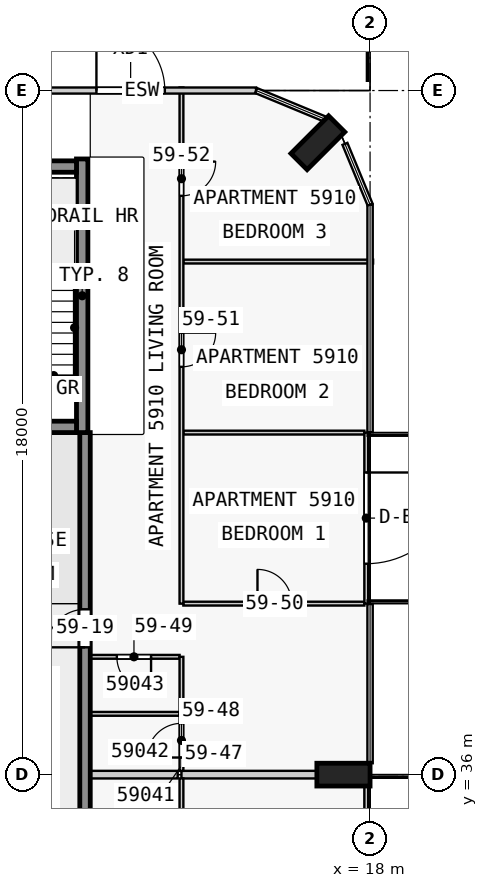
"""IFC4 building model, lengths in metres.
Left out: names, types, materials, properties, quantities, classifications, styles, units other than length and angle.
Written with IfcOpenShell. Run it as: python <this file> out.ifc"""

import sys

from ifc_helpers import new_model, si_unit, direction, frame, frame_2d, origin, origin_2d, place, context, subcontext, project, spatial, rectangle, extrude, element, fill, save


model = new_model("IFC4")
c1 = context("Model", 3, precision=1e-05, world=origin(), true_north=direction((0.0, 1.0)))
c2 = subcontext(c1, "Body", "Model", "MODEL_VIEW")
j1 = project(units=[si_unit("LENGTHUNIT", "METRE"), si_unit("PLANEANGLEUNIT", "RADIAN")], contexts=[c1])
p1 = place(None, origin())
s1 = spatial("IfcSite", under=j1, at=p1, CompositionType="ELEMENT")
p2 = place(p1, origin())
s2 = spatial("IfcBuilding", under=s1, at=p2, CompositionType="ELEMENT")
p3 = place(p2, frame((0.0, 0.0, 225.9)))
s3 = spatial("IfcBuildingStorey", under=s2, at=p3, CompositionType="ELEMENT", Elevation=225.9)
for number, where, z_axis, x_axis in (
    (1, (17.3, 36.0, 0.0), (0.0, 0.0, 1.0), (0.0, 1.0, 0.0)),
    (2, (16.626, 52.626, 0.0), (0.0, 0.0, 1.0), (-0.707, 0.707, 0.0)),
):
    element("IfcColumn", number, at=place(p3, frame(where, z_axis=z_axis, x_axis=x_axis)), inside=s3, PredefinedType="COLUMN", context=c2, shape_type="SweptSolid", body=[
        extrude(rectangle(XDim=0.6, YDim=1.4, at=origin_2d()), origin(), (0.0, 0.0, 1.0), 3.5),
    ])
p4 = place(p3, frame((7.725, 45.15, 0.0), z_axis=(0.0, 0.0, 1.0), x_axis=(1.0, 0.0, 0.0)))
e3 = element("IfcWall", 3, at=p4, inside=s3, PredefinedType="SHEAR", context=c2, shape_type="SweptSolid", body=[
    extrude(rectangle(XDim=2.55, YDim=0.3, at=frame_2d((1.275, 0.0))), origin(), (0.0, 0.0, 1.0), 3.5),
])
p5 = place(p4, frame((0.725, 0.0, 0.0)))
e4 = element("IfcOpeningElement", 4, at=p5, cuts=e3, PredefinedType="OPENING", context=c2, shape_type="SweptSolid", body=[
    extrude(rectangle(XDim=1.1, YDim=2.1, at=frame_2d((0.55, 1.05))), frame((0.0, 0.16, 0.0), z_axis=(0.0, -1.0, 0.0), x_axis=(1.0, 0.0, 0.0)), (0.0, 0.0, 1.0), 0.32),
])
p6 = place(p3, frame((7.725, 52.0, 0.0), z_axis=(0.0, 0.0, 1.0), x_axis=(1.0, 0.0, 0.0)))
e5 = element("IfcWall", 5, at=p6, inside=s3, PredefinedType="SHEAR", context=c2, shape_type="SweptSolid", body=[
    extrude(rectangle(XDim=2.55, YDim=0.3, at=frame_2d((1.275, 0.0))), origin(), (0.0, 0.0, 1.0), 3.5),
])
p7 = place(p3, frame((10.425, 45.0, 0.0), z_axis=(0.0, 0.0, 1.0), x_axis=(0.0, 1.0, 0.0)))
e6 = element("IfcWall", 6, at=p7, inside=s3, PredefinedType="SHEAR", context=c2, shape_type="SweptSolid", body=[
    extrude(rectangle(XDim=7.2, YDim=0.3, at=frame_2d((3.6, 0.0))), origin(), (0.0, 0.0, 1.0), 3.5),
])
p8 = place(p3, frame((10.5, 18.0, 0.0), z_axis=(0.0, 0.0, 1.0), x_axis=(0.0, 1.0, 0.0)))
e7 = element("IfcWall", 7, at=p8, inside=s3, PredefinedType="SHEAR", context=c2, shape_type="SweptSolid", body=[
    extrude(rectangle(XDim=27.0, YDim=0.275, at=frame_2d((13.5, 0.0))), origin(), (0.0, 0.0, 1.0), 3.05),
])
p9 = place(p8, frame((4.05, 0.0, 0.0)))
e8 = element("IfcOpeningElement", 8, at=p9, cuts=e7, PredefinedType="OPENING", context=c2, shape_type="SweptSolid", body=[
    extrude(rectangle(XDim=1.0, YDim=2.1, at=frame_2d((0.5, 1.05))), frame((0.0, 0.147, 0.0), z_axis=(0.0, -1.0, 0.0), x_axis=(1.0, 0.0, 0.0)), (0.0, 0.0, 1.0), 0.295),
])
p10 = place(p8, frame((10.35, 0.0, 0.0)))
e9 = element("IfcOpeningElement", 9, at=p10, cuts=e7, PredefinedType="OPENING", context=c2, shape_type="SweptSolid", body=[
    extrude(rectangle(XDim=1.8, YDim=2.1, at=frame_2d((0.9, 1.05))), frame((0.0, 0.147, 0.0), z_axis=(0.0, -1.0, 0.0), x_axis=(1.0, 0.0, 0.0)), (0.0, 0.0, 1.0), 0.295),
])
p11 = place(p8, frame((15.25, 0.0, 0.0)))
e10 = element("IfcOpeningElement", 10, at=p11, cuts=e7, PredefinedType="OPENING", context=c2, shape_type="SweptSolid", body=[
    extrude(rectangle(XDim=1.0, YDim=2.1, at=frame_2d((0.5, 1.05))), frame((0.0, 0.147, 0.0), z_axis=(0.0, -1.0, 0.0), x_axis=(1.0, 0.0, 0.0)), (0.0, 0.0, 1.0), 0.295),
])
p12 = place(p8, frame((21.35, 0.0, 0.0)))
e11 = element("IfcOpeningElement", 11, at=p12, cuts=e7, PredefinedType="OPENING", context=c2, shape_type="SweptSolid", body=[
    extrude(rectangle(XDim=1.0, YDim=2.1, at=frame_2d((0.5, 1.05))), frame((0.0, 0.147, 0.0), z_axis=(0.0, -1.0, 0.0), x_axis=(1.0, 0.0, 0.0)), (0.0, 0.0, 1.0), 0.295),
])
p13 = place(p3, frame((9.0, 54.0, 0.0), z_axis=(0.0, 0.0, 1.0), x_axis=(1.0, 0.0, 0.0)))
e12 = element("IfcWall", 12, at=p13, inside=s3, PredefinedType="STANDARD", context=c2, shape_type="SweptSolid", body=[
    extrude(rectangle(XDim=6.0, YDim=0.16, at=frame_2d((3.0, 0.0))), origin(), (0.0, 0.0, 1.0), 3.5),
])
p14 = place(p13, frame((1.8, 0.0, 0.0)))
e13 = element("IfcOpeningElement", 13, at=p14, cuts=e12, PredefinedType="OPENING", context=c2, shape_type="SweptSolid", body=[
    extrude(rectangle(XDim=1.8, YDim=2.4, at=frame_2d((0.9, 1.2))), frame((0.0, 0.09, 0.0), z_axis=(0.0, -1.0, 0.0), x_axis=(1.0, 0.0, 0.0)), (0.0, 0.0, 1.0), 0.18),
])
p15 = place(p3, frame((17.9, 36.0, 0.0), z_axis=(0.0, 0.0, 1.0), x_axis=(0.0, -1.0, 0.0)))
e14 = element("IfcWall", 14, at=p15, inside=s3, PredefinedType="STANDARD", context=c2, shape_type="SweptSolid", body=[
    extrude(rectangle(XDim=4.5, YDim=0.1, at=frame_2d((2.25, 0.0))), origin(), (0.0, 0.0, 1.0), 3.05),
])
p16 = place(p15, frame((1.05, 0.0, 0.0)))
e15 = element("IfcOpeningElement", 15, at=p16, cuts=e14, PredefinedType="OPENING", context=c2, shape_type="SweptSolid", body=[
    extrude(rectangle(XDim=2.4, YDim=2.4, at=frame_2d((1.2, 1.2))), frame((0.0, 0.06, 0.0), z_axis=(0.0, -1.0, 0.0), x_axis=(1.0, 0.0, 0.0)), (0.0, 0.0, 1.0), 0.12),
])
p17 = place(p3, frame((17.9, 45.0, 0.0), z_axis=(0.0, 0.0, 1.0), x_axis=(0.0, -1.0, 0.0)))
e16 = element("IfcWall", 16, at=p17, inside=s3, PredefinedType="STANDARD", context=c2, shape_type="SweptSolid", body=[
    extrude(rectangle(XDim=4.5, YDim=0.1, at=frame_2d((2.25, 0.0))), origin(), (0.0, 0.0, 1.0), 3.05),
])
p18 = place(p17, frame((1.05, 0.0, 0.0)))
e17 = element("IfcOpeningElement", 17, at=p18, cuts=e16, PredefinedType="OPENING", context=c2, shape_type="SweptSolid", body=[
    extrude(rectangle(XDim=2.4, YDim=2.4, at=frame_2d((1.2, 1.2))), frame((0.0, 0.06, 0.0), z_axis=(0.0, -1.0, 0.0), x_axis=(1.0, 0.0, 0.0)), (0.0, 0.0, 1.0), 0.12),
])
p19 = place(p3, frame((12.938, 36.0, 0.0), z_axis=(0.0, 0.0, 1.0), x_axis=(-1.0, 0.0, 0.0)))
e18 = element("IfcWall", 18, at=p19, inside=s3, PredefinedType="PARTITIONING", context=c2, shape_type="SweptSolid", body=[
    extrude(rectangle(XDim=2.3, YDim=0.2, at=frame_2d((1.15, 0.0))), origin(), (0.0, 0.0, 1.0), 3.05),
])
p20 = place(p3, frame((13.038, 36.0, 0.0), z_axis=(0.0, 0.0, 1.0), x_axis=(1.0, 0.0, 0.0)))
e19 = element("IfcWall", 19, at=p20, inside=s3, PredefinedType="PARTITIONING", context=c2, shape_type="SweptSolid", body=[
    extrude(rectangle(XDim=3.562, YDim=0.2, at=frame_2d((1.781, 0.0))), origin(), (0.0, 0.0, 1.0), 3.05),
])
p21 = place(p3, frame((12.988, 37.6, 0.0), z_axis=(0.0, 0.0, 1.0), x_axis=(-1.0, 0.0, 0.0)))
e20 = element("IfcWall", 20, at=p21, inside=s3, PredefinedType="PARTITIONING", context=c2, shape_type="SweptSolid", body=[
    extrude(rectangle(XDim=2.35, YDim=0.1, at=frame_2d((1.175, 0.0))), origin(), (0.0, 0.0, 1.0), 3.05),
])
p22 = place(p3, frame((12.988, 39.1, 0.0), z_axis=(0.0, 0.0, 1.0), x_axis=(-1.0, 0.0, 0.0)))
e21 = element("IfcWall", 21, at=p22, inside=s3, PredefinedType="PARTITIONING", context=c2, shape_type="SweptSolid", body=[
    extrude(rectangle(XDim=2.35, YDim=0.1, at=frame_2d((1.175, 0.0))), origin(), (0.0, 0.0, 1.0), 3.05),
])
p23 = place(p22, frame((0.75, 0.0, 0.0)))
e22 = element("IfcOpeningElement", 22, at=p23, cuts=e21, PredefinedType="OPENING", context=c2, shape_type="SweptSolid", body=[
    extrude(rectangle(XDim=0.9, YDim=2.1, at=frame_2d((0.45, 1.05))), frame((0.0, 0.06, 0.0), z_axis=(0.0, -1.0, 0.0), x_axis=(1.0, 0.0, 0.0)), (0.0, 0.0, 1.0), 0.12),
])
p24 = place(p3, frame((13.087, 40.5, 0.0), z_axis=(0.0, 0.0, 1.0), x_axis=(1.0, 0.0, 0.0)))
e23 = element("IfcWall", 23, at=p24, inside=s3, PredefinedType="PARTITIONING", context=c2, shape_type="SweptSolid", body=[
    extrude(rectangle(XDim=4.763, YDim=0.1, at=frame_2d((2.381, 0.0))), origin(), (0.0, 0.0, 1.0), 3.05),
])
p25 = place(p24, frame((1.95, 0.0, 0.0)))
e24 = element("IfcOpeningElement", 24, at=p25, cuts=e23, PredefinedType="OPENING", context=c2, shape_type="SweptSolid", body=[
    extrude(rectangle(XDim=0.9, YDim=2.1, at=frame_2d((0.45, 1.05))), frame((0.0, 0.06, 0.0), z_axis=(0.0, -1.0, 0.0), x_axis=(1.0, 0.0, 0.0)), (0.0, 0.0, 1.0), 0.12),
])
p26 = place(p3, frame((17.85, 45.0, 0.0), z_axis=(0.0, 0.0, 1.0), x_axis=(-1.0, 0.0, 0.0)))
e25 = element("IfcWall", 25, at=p26, inside=s3, PredefinedType="PARTITIONING", context=c2, shape_type="SweptSolid", body=[
    extrude(rectangle(XDim=4.763, YDim=0.1, at=frame_2d((2.381, 0.0))), origin(), (0.0, 0.0, 1.0), 3.05),
])
p27 = place(p3, frame((18.08, 49.5, 0.0), z_axis=(0.0, 0.0, 1.0), x_axis=(-1.0, 0.0, 0.0)))
e26 = element("IfcWall", 26, at=p27, inside=s3, PredefinedType="PARTITIONING", context=c2, shape_type="SweptSolid", body=[
    extrude(rectangle(XDim=4.993, YDim=0.1, at=frame_2d((2.496, 0.0))), origin(), (0.0, 0.0, 1.0), 3.05),
])
p28 = place(p3, frame((13.038, 54.08, 0.0), z_axis=(0.0, 0.0, 1.0), x_axis=(0.0, -1.0, 0.0)))
e27 = element("IfcWall", 27, at=p28, inside=s3, PredefinedType="PARTITIONING", context=c2, shape_type="SweptSolid", body=[
    extrude(rectangle(XDim=13.58, YDim=0.1, at=frame_2d((6.79, 0.0))), origin(), (0.0, 0.0, 1.0), 3.05),
])
p29 = place(p28, frame((6.45, 0.0, 0.0)))
e28 = element("IfcOpeningElement", 28, at=p29, cuts=e27, PredefinedType="OPENING", context=c2, shape_type="SweptSolid", body=[
    extrude(rectangle(XDim=0.9, YDim=2.1, at=frame_2d((0.45, 1.05))), frame((0.0, 0.06, 0.0), z_axis=(0.0, -1.0, 0.0), x_axis=(1.0, 0.0, 0.0)), (0.0, 0.0, 1.0), 0.12),
])
p30 = place(p28, frame((1.95, 0.0, 0.0)))
e29 = element("IfcOpeningElement", 29, at=p30, cuts=e27, PredefinedType="OPENING", context=c2, shape_type="SweptSolid", body=[
    extrude(rectangle(XDim=0.9, YDim=2.1, at=frame_2d((0.45, 1.05))), frame((0.0, 0.06, 0.0), z_axis=(0.0, -1.0, 0.0), x_axis=(1.0, 0.0, 0.0)), (0.0, 0.0, 1.0), 0.12),
])
p31 = place(p3, frame((13.038, 34.5, 0.0), z_axis=(0.0, 0.0, 1.0), x_axis=(0.0, 1.0, 0.0)))
e30 = element("IfcWall", 30, at=p31, inside=s3, PredefinedType="PARTITIONING", context=c2, shape_type="SweptSolid", body=[
    extrude(rectangle(XDim=1.4, YDim=0.1, at=frame_2d((0.7, 0.0))), origin(), (0.0, 0.0, 1.0), 3.05),
])
p32 = place(p3, frame((13.038, 36.1, 0.0), z_axis=(0.0, 0.0, 1.0), x_axis=(0.0, 1.0, 0.0)))
e31 = element("IfcWall", 31, at=p32, inside=s3, PredefinedType="PARTITIONING", context=c2, shape_type="SweptSolid", body=[
    extrude(rectangle(XDim=3.0, YDim=0.1, at=frame_2d((1.5, 0.0))), origin(), (0.0, 0.0, 1.0), 3.05),
])
p33 = place(p32, frame((0.35, 0.0, 0.0)))
e32 = element("IfcOpeningElement", 32, at=p33, cuts=e31, PredefinedType="OPENING", context=c2, shape_type="SweptSolid", body=[
    extrude(rectangle(XDim=0.9, YDim=2.1, at=frame_2d((0.45, 1.05))), frame((0.0, 0.06, 0.0), z_axis=(0.0, -1.0, 0.0), x_axis=(1.0, 0.0, 0.0)), (0.0, 0.0, 1.0), 0.12),
])
p34 = place(p14, origin())
e33 = element("IfcDoor", 33, at=p34, inside=s3, OperationType="SINGLE_SWING_LEFT", PredefinedType="DOOR", context=c2, shape_type="SweptSolid", body=[
    extrude(rectangle(XDim=1.8, YDim=2.4, at=frame_2d((0.9, 1.2))), frame((0.0, 0.025, 0.0), z_axis=(0.0, -1.0, 0.0), x_axis=(1.0, 0.0, 0.0)), (0.0, 0.0, 1.0), 0.05),
])
fill(e13, e33)
p35 = place(p18, origin())
e34 = element("IfcDoor", 34, at=p35, inside=s3, OperationType="SINGLE_SWING_LEFT", PredefinedType="DOOR", context=c2, shape_type="SweptSolid", body=[
    extrude(rectangle(XDim=2.4, YDim=2.4, at=frame_2d((1.2, 1.2))), frame((0.0, 0.025, 0.0), z_axis=(0.0, -1.0, 0.0), x_axis=(1.0, 0.0, 0.0)), (0.0, 0.0, 1.0), 0.05),
])
fill(e17, e34)
p36 = place(p12, origin())
e35 = element("IfcDoor", 35, at=p36, inside=s3, OperationType="SINGLE_SWING_RIGHT", PredefinedType="DOOR", context=c2, shape_type="SweptSolid", body=[
    extrude(rectangle(XDim=1.0, YDim=2.1, at=frame_2d((0.5, 1.05))), frame((0.0, 0.025, 0.0), z_axis=(0.0, -1.0, 0.0), x_axis=(1.0, 0.0, 0.0)), (0.0, 0.0, 1.0), 0.05),
])
fill(e11, e35)
p37 = place(p33, origin())
e36 = element("IfcDoor", 36, at=p37, inside=s3, OperationType="SINGLE_SWING_LEFT", PredefinedType="DOOR", context=c2, shape_type="SweptSolid", body=[
    extrude(rectangle(XDim=0.9, YDim=2.1, at=frame_2d((0.45, 1.05))), frame((0.0, 0.025, 0.0), z_axis=(0.0, -1.0, 0.0), x_axis=(1.0, 0.0, 0.0)), (0.0, 0.0, 1.0), 0.05),
])
fill(e32, e36)
p38 = place(p23, origin())
e37 = element("IfcDoor", 37, at=p38, inside=s3, OperationType="SINGLE_SWING_RIGHT", PredefinedType="DOOR", context=c2, shape_type="SweptSolid", body=[
    extrude(rectangle(XDim=0.9, YDim=2.1, at=frame_2d((0.45, 1.05))), frame((0.0, 0.025, 0.0), z_axis=(0.0, -1.0, 0.0), x_axis=(1.0, 0.0, 0.0)), (0.0, 0.0, 1.0), 0.05),
])
fill(e22, e37)
p39 = place(p25, origin())
e38 = element("IfcDoor", 38, at=p39, inside=s3, OperationType="SINGLE_SWING_RIGHT", PredefinedType="DOOR", context=c2, shape_type="SweptSolid", body=[
    extrude(rectangle(XDim=0.9, YDim=2.1, at=frame_2d((0.45, 1.05))), frame((0.0, 0.025, 0.0), z_axis=(0.0, -1.0, 0.0), x_axis=(1.0, 0.0, 0.0)), (0.0, 0.0, 1.0), 0.05),
])
fill(e24, e38)
p40 = place(p29, origin())
e39 = element("IfcDoor", 39, at=p40, inside=s3, OperationType="SINGLE_SWING_RIGHT", PredefinedType="DOOR", context=c2, shape_type="SweptSolid", body=[
    extrude(rectangle(XDim=0.9, YDim=2.1, at=frame_2d((0.45, 1.05))), frame((0.0, 0.025, 0.0), z_axis=(0.0, -1.0, 0.0), x_axis=(1.0, 0.0, 0.0)), (0.0, 0.0, 1.0), 0.05),
])
fill(e28, e39)
p41 = place(p30, origin())
e40 = element("IfcDoor", 40, at=p41, inside=s3, OperationType="SINGLE_SWING_LEFT", PredefinedType="DOOR", context=c2, shape_type="SweptSolid", body=[
    extrude(rectangle(XDim=0.9, YDim=2.1, at=frame_2d((0.45, 1.05))), frame((0.0, 0.025, 0.0), z_axis=(0.0, -1.0, 0.0), x_axis=(1.0, 0.0, 0.0)), (0.0, 0.0, 1.0), 0.05),
])
fill(e29, e40)
save(model, sys.argv[1])
